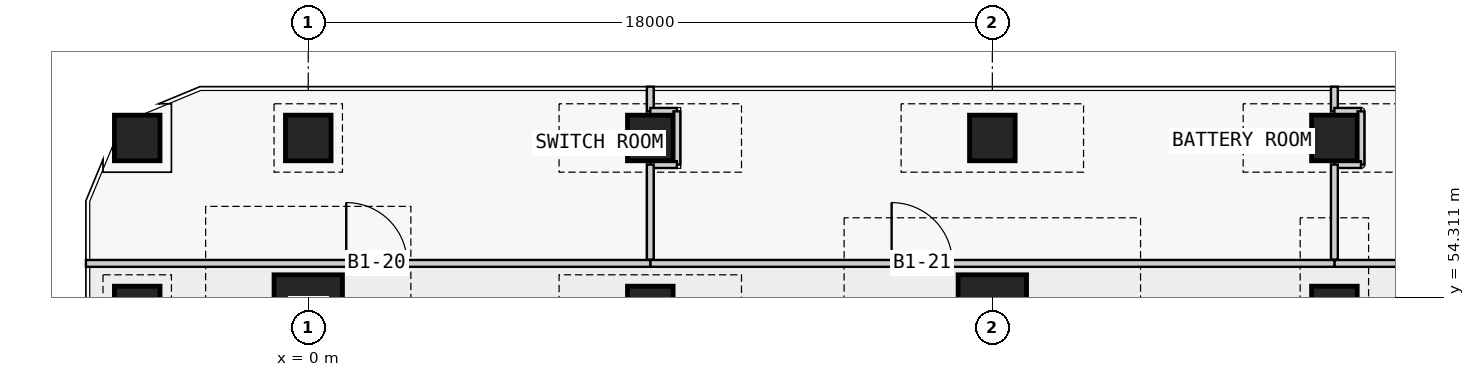
"""IFC4 building model, lengths in metres.
Left out: names, types, materials, properties, quantities, classifications, styles, units other than length and angle.
Written with IfcOpenShell. Run it as: python <this file> out.ifc"""

import sys

from ifc_helpers import new_model, si_unit, direction, frame, frame_2d, origin, origin_2d, place, context, subcontext, project, spatial, rectangle, extrude, element, fill, save


model = new_model("IFC4")
c1 = context("Model", 3, precision=1e-05, world=origin(), true_north=direction((0.0, 1.0)))
c2 = subcontext(c1, "Body", "Model", "MODEL_VIEW")
j1 = project(units=[si_unit("LENGTHUNIT", "METRE"), si_unit("PLANEANGLEUNIT", "RADIAN")], contexts=[c1])
p1 = place(None, origin())
s1 = spatial("IfcSite", under=j1, at=p1, CompositionType="ELEMENT")
p2 = place(p1, origin())
s2 = spatial("IfcBuilding", under=s1, at=p2, CompositionType="ELEMENT")
p3 = place(p2, frame((0.0, 0.0, -7.0)))
s3 = spatial("IfcBuildingStorey", under=s2, at=p3, CompositionType="ELEMENT", Elevation=-7.0)
for number, where, z_axis, x_axis in (
    (1, (-4.5, 54.0, 0.0), (0.0, 0.0, 1.0), (1.0, 0.0, 0.0)),
    (2, (-4.5, 58.5, 0.0), (0.0, 0.0, 1.0), (1.0, 0.0, 0.0)),
):
    element("IfcColumn", number, at=place(p3, frame(where, z_axis=z_axis, x_axis=x_axis)), inside=s3, PredefinedType="COLUMN", context=c2, shape_type="SweptSolid", body=[
        extrude(rectangle(XDim=1.2, YDim=1.2, at=origin_2d()), origin(), (0.0, 0.0, 1.0), 7.0),
    ])
p4 = place(p3, frame((0.0, 54.0, 0.0), z_axis=(0.0, 0.0, 1.0), x_axis=(1.0, 0.0, 0.0)))
e3 = element("IfcColumn", 3, at=p4, inside=s3, PredefinedType="COLUMN", context=c2, shape_type="SweptSolid", body=[
    extrude(rectangle(XDim=1.8, YDim=1.8, at=origin_2d()), origin(), (0.0, 0.0, 1.0), 7.0),
])
for number, where, z_axis, x_axis in (
    (4, (0.0, 58.5, 0.0), (0.0, 0.0, 1.0), (1.0, 0.0, 0.0)),
    (5, (9.0, 54.0, 0.0), (0.0, 0.0, 1.0), (1.0, 0.0, 0.0)),
    (6, (9.0, 58.5, 0.0), (0.0, 0.0, 1.0), (1.0, 0.0, 0.0)),
):
    element("IfcColumn", number, at=place(p3, frame(where, z_axis=z_axis, x_axis=x_axis)), inside=s3, PredefinedType="COLUMN", context=c2, shape_type="SweptSolid", body=[
        extrude(rectangle(XDim=1.2, YDim=1.2, at=origin_2d()), origin(), (0.0, 0.0, 1.0), 7.0),
    ])
p5 = place(p3, frame((18.0, 54.0, 0.0), z_axis=(0.0, 0.0, 1.0), x_axis=(1.0, 0.0, 0.0)))
e7 = element("IfcColumn", 7, at=p5, inside=s3, PredefinedType="COLUMN", context=c2, shape_type="SweptSolid", body=[
    extrude(rectangle(XDim=1.8, YDim=1.8, at=origin_2d()), origin(), (0.0, 0.0, 1.0), 7.0),
])
for number, where, z_axis, x_axis in (
    (8, (18.0, 58.5, 0.0), (0.0, 0.0, 1.0), (1.0, 0.0, 0.0)),
    (9, (27.0, 54.0, 0.0), (0.0, 0.0, 1.0), (1.0, 0.0, 0.0)),
    (10, (27.0, 58.5, 0.0), (0.0, 0.0, 1.0), (1.0, 0.0, 0.0)),
):
    element("IfcColumn", number, at=place(p3, frame(where, z_axis=z_axis, x_axis=x_axis)), inside=s3, PredefinedType="COLUMN", context=c2, shape_type="SweptSolid", body=[
        extrude(rectangle(XDim=1.2, YDim=1.2, at=origin_2d()), origin(), (0.0, 0.0, 1.0), 7.0),
    ])
p6 = place(p3, frame((27.0, 55.2, 0.0), z_axis=(0.0, 0.0, 1.0), x_axis=(1.0, 0.0, 0.0)))
e11 = element("IfcWall", 11, at=p6, inside=s3, PredefinedType="PARTITIONING", context=c2, shape_type="SweptSolid", body=[
    extrude(rectangle(XDim=18.0, YDim=0.18, at=frame_2d((9.0, 0.0))), origin(), (0.0, 0.0, 1.0), 6.55),
])
p7 = place(p6, frame((6.6, 0.0, 0.0)))
e12 = element("IfcOpeningElement", 12, at=p7, cuts=e11, PredefinedType="OPENING", context=c2, shape_type="SweptSolid", body=[
    extrude(rectangle(XDim=1.6, YDim=2.4, at=frame_2d((0.8, 1.2))), frame((0.0, 0.1, 0.0), z_axis=(0.0, -1.0, 0.0), x_axis=(1.0, 0.0, 0.0)), (0.0, 0.0, 1.0), 0.2),
])
p8 = place(p3, frame((9.0, 55.2, 0.0), z_axis=(0.0, 0.0, 1.0), x_axis=(1.0, 0.0, 0.0)))
e13 = element("IfcWall", 13, at=p8, inside=s3, PredefinedType="PARTITIONING", context=c2, shape_type="SweptSolid", body=[
    extrude(rectangle(XDim=18.0, YDim=0.18, at=frame_2d((9.0, 0.0))), origin(), (0.0, 0.0, 1.0), 6.55),
])
p9 = place(p8, frame((6.35, 0.0, 0.0)))
e14 = element("IfcOpeningElement", 14, at=p9, cuts=e13, PredefinedType="OPENING", context=c2, shape_type="SweptSolid", body=[
    extrude(rectangle(XDim=1.6, YDim=2.4, at=frame_2d((0.8, 1.2))), frame((0.0, 0.1, 0.0), z_axis=(0.0, -1.0, 0.0), x_axis=(1.0, 0.0, 0.0)), (0.0, 0.0, 1.0), 0.2),
])
p10 = place(p3, frame((-5.85, 55.2, 0.0), z_axis=(0.0, 0.0, 1.0), x_axis=(1.0, 0.0, 0.0)))
e15 = element("IfcWall", 15, at=p10, inside=s3, PredefinedType="PARTITIONING", context=c2, shape_type="SweptSolid", body=[
    extrude(rectangle(XDim=14.85, YDim=0.18, at=frame_2d((7.425, 0.0))), origin(), (0.0, 0.0, 1.0), 6.55),
])
p11 = place(p10, frame((6.85, 0.0, 0.0)))
e16 = element("IfcOpeningElement", 16, at=p11, cuts=e15, PredefinedType="OPENING", context=c2, shape_type="SweptSolid", body=[
    extrude(rectangle(XDim=1.6, YDim=2.4, at=frame_2d((0.8, 1.2))), frame((0.0, 0.1, 0.0), z_axis=(0.0, -1.0, 0.0), x_axis=(1.0, 0.0, 0.0)), (0.0, 0.0, 1.0), 0.2),
])
p12 = place(p3, frame((27.0, 59.85, 0.0), z_axis=(0.0, 0.0, 1.0), x_axis=(0.0, -1.0, 0.0)))
e17 = element("IfcWall", 17, at=p12, inside=s3, PredefinedType="PARTITIONING", context=c2, shape_type="SweptSolid", body=[
    extrude(rectangle(XDim=0.65, YDim=0.18, at=frame_2d((0.325, 0.0))), origin(), (0.0, 0.0, 1.0), 6.55),
])
p13 = place(p3, frame((27.0, 59.2, 0.0), z_axis=(0.0, 0.0, 1.0), x_axis=(1.0, 0.0, 0.0)))
e18 = element("IfcWall", 18, at=p13, inside=s3, PredefinedType="PARTITIONING", context=c2, shape_type="SweptSolid", body=[
    extrude(rectangle(XDim=0.7, YDim=0.18, at=frame_2d((0.35, 0.0))), origin(), (0.0, 0.0, 1.0), 6.55),
])
p14 = place(p3, frame((27.7, 59.2, 0.0), z_axis=(0.0, 0.0, 1.0), x_axis=(0.0, -1.0, 0.0)))
e19 = element("IfcWall", 19, at=p14, inside=s3, PredefinedType="PARTITIONING", context=c2, shape_type="SweptSolid", body=[
    extrude(rectangle(XDim=1.4, YDim=0.18, at=frame_2d((0.7, 0.0))), origin(), (0.0, 0.0, 1.0), 6.55),
])
p15 = place(p3, frame((27.7, 57.8, 0.0), z_axis=(0.0, 0.0, 1.0), x_axis=(-1.0, 0.0, 0.0)))
e20 = element("IfcWall", 20, at=p15, inside=s3, PredefinedType="PARTITIONING", context=c2, shape_type="SweptSolid", body=[
    extrude(rectangle(XDim=0.7, YDim=0.18, at=frame_2d((0.35, 0.0))), origin(), (0.0, 0.0, 1.0), 6.55),
])
p16 = place(p3, frame((27.0, 57.8, 0.0), z_axis=(0.0, 0.0, 1.0), x_axis=(0.0, -1.0, 0.0)))
e21 = element("IfcWall", 21, at=p16, inside=s3, PredefinedType="PARTITIONING", context=c2, shape_type="SweptSolid", body=[
    extrude(rectangle(XDim=2.5, YDim=0.18, at=frame_2d((1.25, 0.0))), origin(), (0.0, 0.0, 1.0), 6.55),
])
p17 = place(p3, frame((9.0, 59.85, 0.0), z_axis=(0.0, 0.0, 1.0), x_axis=(0.0, -1.0, 0.0)))
e22 = element("IfcWall", 22, at=p17, inside=s3, PredefinedType="PARTITIONING", context=c2, shape_type="SweptSolid", body=[
    extrude(rectangle(XDim=0.65, YDim=0.18, at=frame_2d((0.325, 0.0))), origin(), (0.0, 0.0, 1.0), 6.55),
])
p18 = place(p3, frame((9.0, 59.2, 0.0), z_axis=(0.0, 0.0, 1.0), x_axis=(1.0, 0.0, 0.0)))
e23 = element("IfcWall", 23, at=p18, inside=s3, PredefinedType="PARTITIONING", context=c2, shape_type="SweptSolid", body=[
    extrude(rectangle(XDim=0.7, YDim=0.18, at=frame_2d((0.35, 0.0))), origin(), (0.0, 0.0, 1.0), 6.55),
])
p19 = place(p3, frame((9.7, 59.2, 0.0), z_axis=(0.0, 0.0, 1.0), x_axis=(0.0, -1.0, 0.0)))
e24 = element("IfcWall", 24, at=p19, inside=s3, PredefinedType="PARTITIONING", context=c2, shape_type="SweptSolid", body=[
    extrude(rectangle(XDim=1.4, YDim=0.18, at=frame_2d((0.7, 0.0))), origin(), (0.0, 0.0, 1.0), 6.55),
])
p20 = place(p3, frame((9.7, 57.8, 0.0), z_axis=(0.0, 0.0, 1.0), x_axis=(-1.0, 0.0, 0.0)))
e25 = element("IfcWall", 25, at=p20, inside=s3, PredefinedType="PARTITIONING", context=c2, shape_type="SweptSolid", body=[
    extrude(rectangle(XDim=0.7, YDim=0.18, at=frame_2d((0.35, 0.0))), origin(), (0.0, 0.0, 1.0), 6.55),
])
p21 = place(p3, frame((9.0, 57.8, 0.0), z_axis=(0.0, 0.0, 1.0), x_axis=(0.0, -1.0, 0.0)))
e26 = element("IfcWall", 26, at=p21, inside=s3, PredefinedType="PARTITIONING", context=c2, shape_type="SweptSolid", body=[
    extrude(rectangle(XDim=2.5, YDim=0.18, at=frame_2d((1.25, 0.0))), origin(), (0.0, 0.0, 1.0), 6.55),
])
p22 = place(p11, origin())
e27 = element("IfcDoor", 27, at=p22, inside=s3, OperationType="SINGLE_SWING_LEFT", PredefinedType="DOOR", context=c2, shape_type="SweptSolid", body=[
    extrude(rectangle(XDim=1.6, YDim=2.4, at=frame_2d((0.8, 1.2))), frame((0.0, 0.025, 0.0), z_axis=(0.0, -1.0, 0.0), x_axis=(1.0, 0.0, 0.0)), (0.0, 0.0, 1.0), 0.05),
])
fill(e16, e27)
p23 = place(p9, origin())
e28 = element("IfcDoor", 28, at=p23, inside=s3, OperationType="SINGLE_SWING_LEFT", PredefinedType="DOOR", context=c2, shape_type="SweptSolid", body=[
    extrude(rectangle(XDim=1.6, YDim=2.4, at=frame_2d((0.8, 1.2))), frame((0.0, 0.025, 0.0), z_axis=(0.0, -1.0, 0.0), x_axis=(1.0, 0.0, 0.0)), (0.0, 0.0, 1.0), 0.05),
])
fill(e14, e28)
save(model, sys.argv[1])
